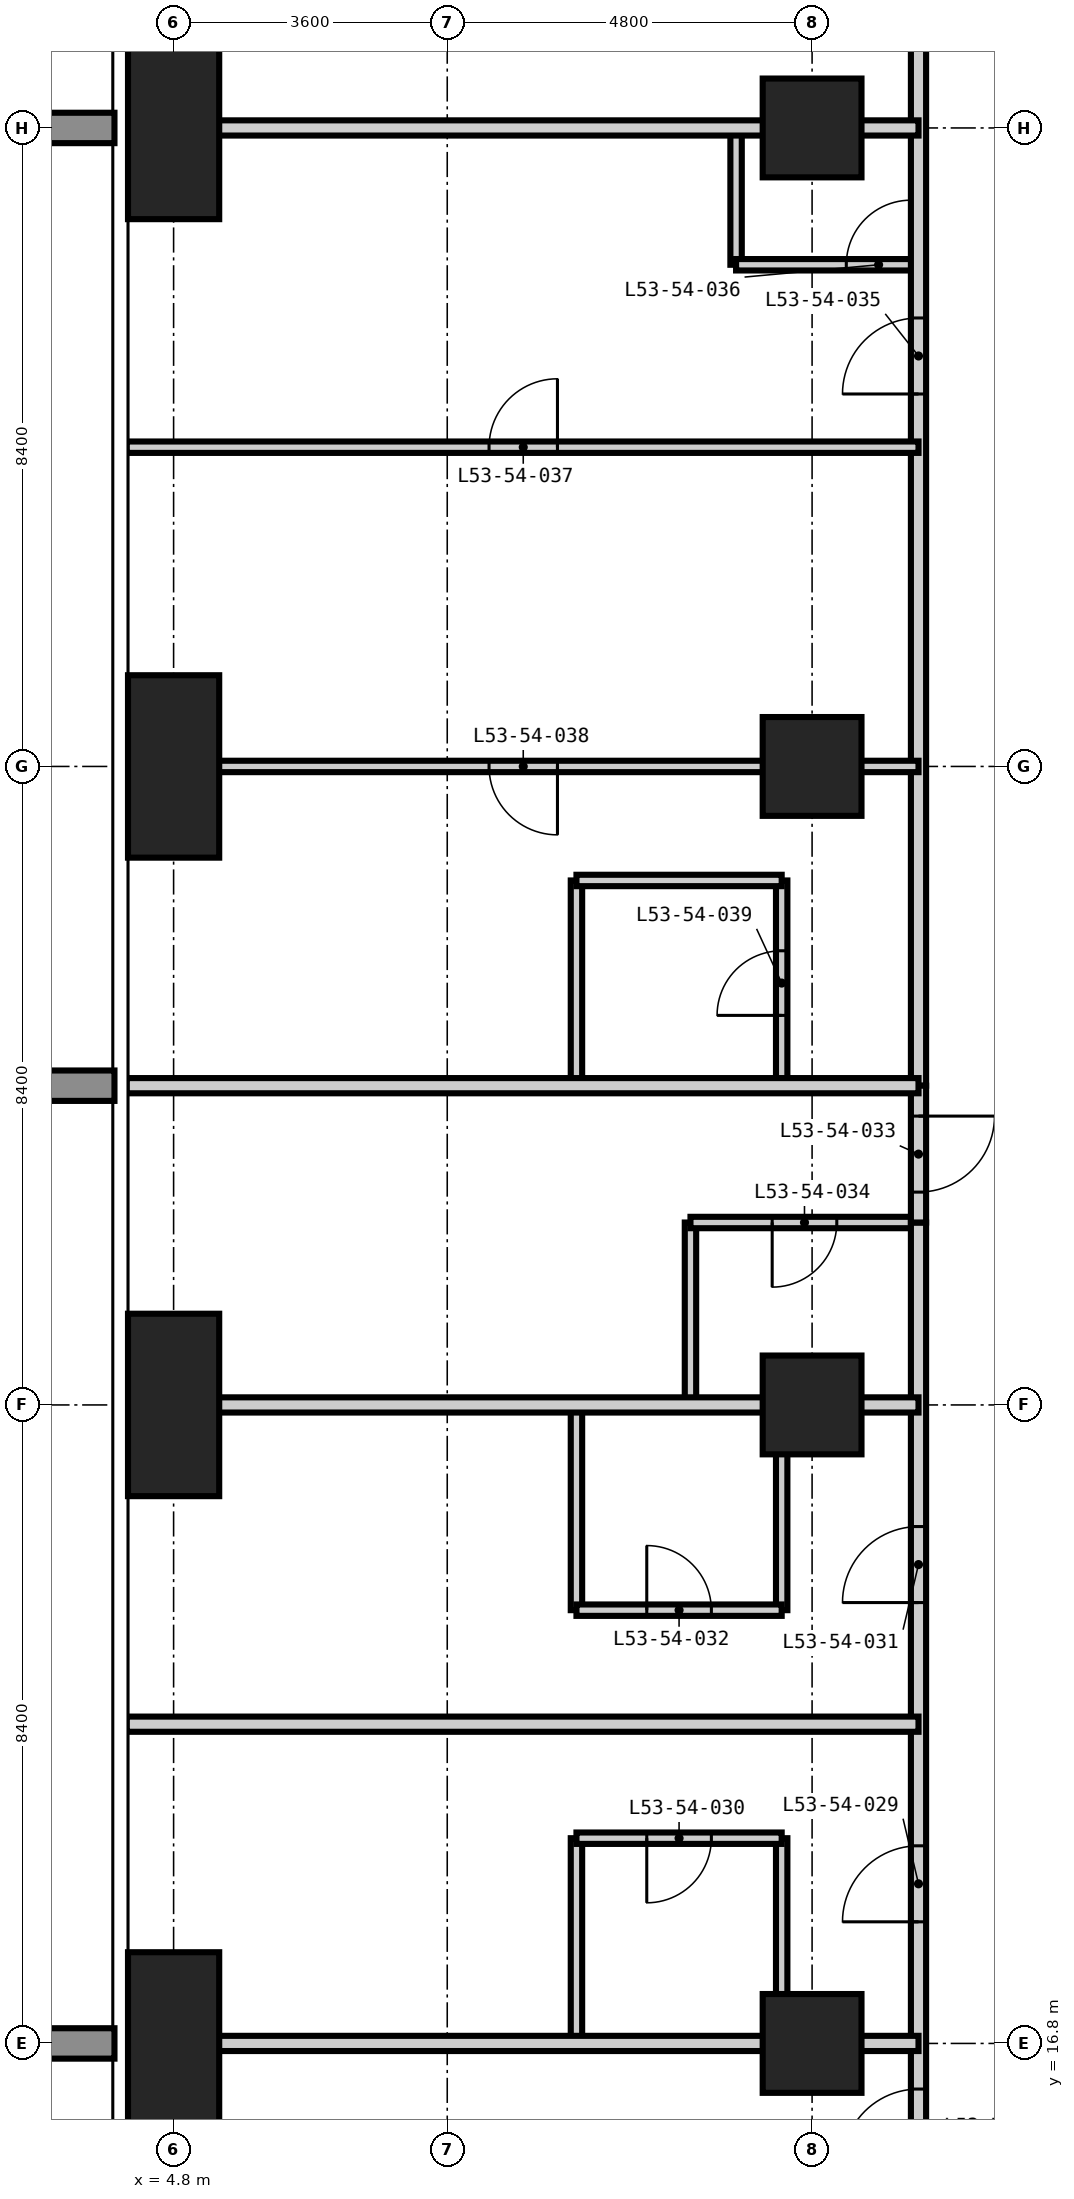
"""IFC4 building model, lengths in metres.
Left out: names, types, materials, properties, quantities, classifications, styles, units other than length and angle.
Written with IfcOpenShell. Run it as: python <this file> out.ifc"""

import sys

from ifc_helpers import new_model, si_unit, direction, frame, frame_2d, origin, origin_2d, place, context, subcontext, project, spatial, rectangle, extrude, element, fill, save


model = new_model("IFC4")
c1 = context("Model", 3, precision=1e-05, world=origin(), true_north=direction((0.0, 1.0)))
c2 = subcontext(c1, "Body", "Model", "MODEL_VIEW")
j1 = project(units=[si_unit("LENGTHUNIT", "METRE"), si_unit("PLANEANGLEUNIT", "RADIAN")], contexts=[c1])
p1 = place(None, origin())
s1 = spatial("IfcSite", under=j1, at=p1, CompositionType="ELEMENT")
p2 = place(p1, origin())
s2 = spatial("IfcBuilding", under=s1, at=p2, CompositionType="ELEMENT")
p3 = place(p2, frame((0.0, 0.0, 205.8)))
s3 = spatial("IfcBuildingStorey", under=s2, at=p3, CompositionType="ELEMENT", Elevation=205.8)
for number, where, z_axis, x_axis in (
    (1, (4.8, 16.8, -0.35), (0.0, 0.0, 1.0), (1.0, 0.0, 0.0)),
    (2, (4.8, 25.2, -0.35), (0.0, 0.0, 1.0), (1.0, 0.0, 0.0)),
    (3, (4.8, 33.6, -0.35), (0.0, 0.0, 1.0), (1.0, 0.0, 0.0)),
    (4, (4.8, 42.0, -0.35), (0.0, 0.0, 1.0), (1.0, 0.0, 0.0)),
):
    element("IfcColumn", number, at=place(p3, frame(where, z_axis=z_axis, x_axis=x_axis)), inside=s3, PredefinedType="COLUMN", context=c2, shape_type="SweptSolid", body=[
        extrude(rectangle(XDim=1.2, YDim=2.4, at=origin_2d()), origin(), (0.0, 0.0, 1.0), 3.6),
    ])
for number, where, z_axis, x_axis in (
    (5, (13.2, 16.8, -0.35), (0.0, 0.0, 1.0), (1.0, 0.0, 0.0)),
    (6, (13.2, 25.2, -0.35), (0.0, 0.0, 1.0), (1.0, 0.0, 0.0)),
    (7, (13.2, 33.6, -0.35), (0.0, 0.0, 1.0), (1.0, 0.0, 0.0)),
    (8, (13.2, 42.0, -0.35), (0.0, 0.0, 1.0), (1.0, 0.0, 0.0)),
):
    element("IfcColumn", number, at=place(p3, frame(where, z_axis=z_axis, x_axis=x_axis)), inside=s3, PredefinedType="COLUMN", context=c2, shape_type="SweptSolid", body=[
        extrude(rectangle(XDim=1.3, YDim=1.3, at=origin_2d()), origin(), (0.0, 0.0, 1.0), 3.6),
    ])
for number, where, z_axis, x_axis in (
    (9, (10.1, 16.8, 0.0), (0.0, 0.0, 1.0), (0.0, 1.0, 0.0)),
    (10, (10.1, 22.5, 0.0), (0.0, 0.0, 1.0), (0.0, 1.0, 0.0)),
):
    element("IfcWall", number, at=place(p3, frame(where, z_axis=z_axis, x_axis=x_axis)), inside=s3, PredefinedType="PARTITIONING", context=c2, shape_type="SweptSolid", body=[
        extrude(rectangle(XDim=2.7, YDim=0.15, at=frame_2d((1.35, 0.0))), origin(), (0.0, 0.0, 1.0), 3.25),
    ])
p4 = place(p3, frame((10.1, 29.4, 0.0), z_axis=(0.0, 0.0, 1.0), x_axis=(0.0, 1.0, 0.0)))
e11 = element("IfcWall", 11, at=p4, inside=s3, PredefinedType="PARTITIONING", context=c2, shape_type="SweptSolid", body=[
    extrude(rectangle(XDim=2.7, YDim=0.15, at=frame_2d((1.35, 0.0))), origin(), (0.0, 0.0, 1.0), 3.25),
])
p5 = place(p3, frame((11.6, 25.2, 0.0), z_axis=(0.0, 0.0, 1.0), x_axis=(0.0, 1.0, 0.0)))
e12 = element("IfcWall", 12, at=p5, inside=s3, PredefinedType="PARTITIONING", context=c2, shape_type="SweptSolid", body=[
    extrude(rectangle(XDim=2.4, YDim=0.15, at=frame_2d((1.2, 0.0))), origin(), (0.0, 0.0, 1.0), 3.25),
])
p6 = place(p3, frame((12.2, 40.2, 0.0), z_axis=(0.0, 0.0, 1.0), x_axis=(0.0, 1.0, 0.0)))
e13 = element("IfcWall", 13, at=p6, inside=s3, PredefinedType="PARTITIONING", context=c2, shape_type="SweptSolid", body=[
    extrude(rectangle(XDim=1.8, YDim=0.15, at=frame_2d((0.9, 0.0))), origin(), (0.0, 0.0, 1.0), 3.25),
])
for number, where, z_axis, x_axis in (
    (14, (12.8, 16.8, 0.0), (0.0, 0.0, 1.0), (0.0, 1.0, 0.0)),
    (15, (12.8, 22.5, 0.0), (0.0, 0.0, 1.0), (0.0, 1.0, 0.0)),
):
    element("IfcWall", number, at=place(p3, frame(where, z_axis=z_axis, x_axis=x_axis)), inside=s3, PredefinedType="PARTITIONING", context=c2, shape_type="SweptSolid", body=[
        extrude(rectangle(XDim=2.7, YDim=0.15, at=frame_2d((1.35, 0.0))), origin(), (0.0, 0.0, 1.0), 3.25),
    ])
p7 = place(p3, frame((12.8, 29.4, 0.0), z_axis=(0.0, 0.0, 1.0), x_axis=(0.0, 1.0, 0.0)))
e16 = element("IfcWall", 16, at=p7, inside=s3, PredefinedType="PARTITIONING", context=c2, shape_type="SweptSolid", body=[
    extrude(rectangle(XDim=2.7, YDim=0.15, at=frame_2d((1.35, 0.0))), origin(), (0.0, 0.0, 1.0), 3.25),
])
p8 = place(p7, frame((0.925, 0.0, 0.0)))
e17 = element("IfcOpeningElement", 17, at=p8, cuts=e16, PredefinedType="OPENING", context=c2, shape_type="SweptSolid", body=[
    extrude(rectangle(XDim=0.85, YDim=2.1, at=frame_2d((0.425, 1.05))), frame((0.0, 0.085, 0.0), z_axis=(0.0, -1.0, 0.0), x_axis=(1.0, 0.0, 0.0)), (0.0, 0.0, 1.0), 0.17),
])
p9 = place(p3, frame((10.1, 19.5, 0.0), z_axis=(0.0, 0.0, 1.0), x_axis=(1.0, 0.0, 0.0)))
e18 = element("IfcWall", 18, at=p9, inside=s3, PredefinedType="PARTITIONING", context=c2, shape_type="SweptSolid", body=[
    extrude(rectangle(XDim=2.7, YDim=0.15, at=frame_2d((1.35, 0.0))), origin(), (0.0, 0.0, 1.0), 3.25),
])
p10 = place(p9, frame((0.925, 0.0, 0.0)))
e19 = element("IfcOpeningElement", 19, at=p10, cuts=e18, PredefinedType="OPENING", context=c2, shape_type="SweptSolid", body=[
    extrude(rectangle(XDim=0.85, YDim=2.1, at=frame_2d((0.425, 1.05))), frame((0.0, 0.085, 0.0), z_axis=(0.0, -1.0, 0.0), x_axis=(1.0, 0.0, 0.0)), (0.0, 0.0, 1.0), 0.17),
])
p11 = place(p3, frame((10.1, 22.5, 0.0), z_axis=(0.0, 0.0, 1.0), x_axis=(1.0, 0.0, 0.0)))
e20 = element("IfcWall", 20, at=p11, inside=s3, PredefinedType="PARTITIONING", context=c2, shape_type="SweptSolid", body=[
    extrude(rectangle(XDim=2.7, YDim=0.15, at=frame_2d((1.35, 0.0))), origin(), (0.0, 0.0, 1.0), 3.25),
])
p12 = place(p11, frame((0.925, 0.0, 0.0)))
e21 = element("IfcOpeningElement", 21, at=p12, cuts=e20, PredefinedType="OPENING", context=c2, shape_type="SweptSolid", body=[
    extrude(rectangle(XDim=0.85, YDim=2.1, at=frame_2d((0.425, 1.05))), frame((0.0, 0.085, 0.0), z_axis=(0.0, -1.0, 0.0), x_axis=(1.0, 0.0, 0.0)), (0.0, 0.0, 1.0), 0.17),
])
p13 = place(p3, frame((11.6, 27.6, 0.0), z_axis=(0.0, 0.0, 1.0), x_axis=(1.0, 0.0, 0.0)))
e22 = element("IfcWall", 22, at=p13, inside=s3, PredefinedType="PARTITIONING", context=c2, shape_type="SweptSolid", body=[
    extrude(rectangle(XDim=3.0, YDim=0.15, at=frame_2d((1.5, 0.0))), origin(), (0.0, 0.0, 1.0), 3.25),
])
p14 = place(p13, frame((1.075, 0.0, 0.0)))
e23 = element("IfcOpeningElement", 23, at=p14, cuts=e22, PredefinedType="OPENING", context=c2, shape_type="SweptSolid", body=[
    extrude(rectangle(XDim=0.85, YDim=2.1, at=frame_2d((0.425, 1.05))), frame((0.0, 0.085, 0.0), z_axis=(0.0, -1.0, 0.0), x_axis=(1.0, 0.0, 0.0)), (0.0, 0.0, 1.0), 0.17),
])
p15 = place(p3, frame((10.1, 32.1, 0.0), z_axis=(0.0, 0.0, 1.0), x_axis=(1.0, 0.0, 0.0)))
e24 = element("IfcWall", 24, at=p15, inside=s3, PredefinedType="PARTITIONING", context=c2, shape_type="SweptSolid", body=[
    extrude(rectangle(XDim=2.7, YDim=0.15, at=frame_2d((1.35, 0.0))), origin(), (0.0, 0.0, 1.0), 3.25),
])
p16 = place(p3, frame((12.2, 40.2, 0.0), z_axis=(0.0, 0.0, 1.0), x_axis=(1.0, 0.0, 0.0)))
e25 = element("IfcWall", 25, at=p16, inside=s3, PredefinedType="PARTITIONING", context=c2, shape_type="SweptSolid", body=[
    extrude(rectangle(XDim=2.4, YDim=0.15, at=frame_2d((1.2, 0.0))), origin(), (0.0, 0.0, 1.0), 3.25),
])
p17 = place(p16, frame((1.45, 0.0, 0.0)))
e26 = element("IfcOpeningElement", 26, at=p17, cuts=e25, PredefinedType="OPENING", context=c2, shape_type="SweptSolid", body=[
    extrude(rectangle(XDim=0.85, YDim=2.1, at=frame_2d((0.425, 1.05))), frame((0.0, 0.085, 0.0), z_axis=(0.0, -1.0, 0.0), x_axis=(1.0, 0.0, 0.0)), (0.0, 0.0, 1.0), 0.17),
])
p18 = place(p3, frame((14.6, 14.6, 0.0), z_axis=(0.0, 0.0, 1.0), x_axis=(0.0, 1.0, 0.0)))
e27 = element("IfcWall", 27, at=p18, inside=s3, PredefinedType="PARTITIONING", context=c2, shape_type="SweptSolid", body=[
    extrude(rectangle(XDim=13.0, YDim=0.2, at=frame_2d((6.5, 0.0))), origin(), (0.0, 0.0, 1.0), 3.25),
])
p19 = place(p18, frame((3.8, 0.0, 0.0)))
e28 = element("IfcOpeningElement", 28, at=p19, cuts=e27, PredefinedType="OPENING", context=c2, shape_type="SweptSolid", body=[
    extrude(rectangle(XDim=1.0, YDim=2.2, at=frame_2d((0.5, 1.1))), frame((0.0, 0.11, 0.0), z_axis=(0.0, -1.0, 0.0), x_axis=(1.0, 0.0, 0.0)), (0.0, 0.0, 1.0), 0.22),
])
p20 = place(p18, frame((8.0, 0.0, 0.0)))
e29 = element("IfcOpeningElement", 29, at=p20, cuts=e27, PredefinedType="OPENING", context=c2, shape_type="SweptSolid", body=[
    extrude(rectangle(XDim=1.0, YDim=2.2, at=frame_2d((0.5, 1.1))), frame((0.0, 0.11, 0.0), z_axis=(0.0, -1.0, 0.0), x_axis=(1.0, 0.0, 0.0)), (0.0, 0.0, 1.0), 0.22),
])
p21 = place(p18, frame((0.6, 0.0, 0.0)))
e30 = element("IfcOpeningElement", 30, at=p21, cuts=e27, PredefinedType="OPENING", context=c2, shape_type="SweptSolid", body=[
    extrude(rectangle(XDim=1.0, YDim=2.2, at=frame_2d((0.5, 1.1))), frame((0.0, 0.11, 0.0), z_axis=(0.0, -1.0, 0.0), x_axis=(1.0, 0.0, 0.0)), (0.0, 0.0, 1.0), 0.22),
])
p22 = place(p3, frame((14.6, 29.4, 0.0), z_axis=(0.0, 0.0, 1.0), x_axis=(0.0, 1.0, 0.0)))
e31 = element("IfcWall", 31, at=p22, inside=s3, PredefinedType="PARTITIONING", context=c2, shape_type="SweptSolid", body=[
    extrude(rectangle(XDim=16.0, YDim=0.2, at=frame_2d((8.0, 0.0))), origin(), (0.0, 0.0, 1.0), 3.25),
])
p23 = place(p22, frame((9.1, 0.0, 0.0)))
e32 = element("IfcOpeningElement", 32, at=p23, cuts=e31, PredefinedType="OPENING", context=c2, shape_type="SweptSolid", body=[
    extrude(rectangle(XDim=1.0, YDim=2.2, at=frame_2d((0.5, 1.1))), frame((0.0, 0.11, 0.0), z_axis=(0.0, -1.0, 0.0), x_axis=(1.0, 0.0, 0.0)), (0.0, 0.0, 1.0), 0.22),
])
p24 = place(p22, frame((13.8, 0.0, 0.0)))
e33 = element("IfcOpeningElement", 33, at=p24, cuts=e31, PredefinedType="OPENING", context=c2, shape_type="SweptSolid", body=[
    extrude(rectangle(XDim=1.0, YDim=2.2, at=frame_2d((0.5, 1.1))), frame((0.0, 0.11, 0.0), z_axis=(0.0, -1.0, 0.0), x_axis=(1.0, 0.0, 0.0)), (0.0, 0.0, 1.0), 0.22),
])
p25 = place(p3, frame((14.6, 29.4, 0.0), z_axis=(0.0, 0.0, 1.0), x_axis=(0.0, -1.0, 0.0)))
e34 = element("IfcWall", 34, at=p25, inside=s3, PredefinedType="PARTITIONING", context=c2, shape_type="SweptSolid", body=[
    extrude(rectangle(XDim=1.8, YDim=0.2, at=frame_2d((0.9, 0.0))), origin(), (0.0, 0.0, 1.0), 3.25),
])
p26 = place(p25, frame((0.4, 0.0, 0.0)))
e35 = element("IfcOpeningElement", 35, at=p26, cuts=e34, PredefinedType="OPENING", context=c2, shape_type="SweptSolid", body=[
    extrude(rectangle(XDim=1.0, YDim=2.2, at=frame_2d((0.5, 1.1))), frame((0.0, 0.11, 0.0), z_axis=(0.0, -1.0, 0.0), x_axis=(1.0, 0.0, 0.0)), (0.0, 0.0, 1.0), 0.22),
])
for number, where, z_axis, x_axis in (
    (36, (4.182, 16.8, 0.0), (0.0, 0.0, 1.0), (1.0, 0.0, 0.0)),
    (37, (4.182, 21.0, 0.0), (0.0, 0.0, 1.0), (1.0, 0.0, 0.0)),
    (38, (4.182, 25.2, 0.0), (0.0, 0.0, 1.0), (1.0, 0.0, 0.0)),
    (39, (4.182, 29.4, 0.0), (0.0, 0.0, 1.0), (1.0, 0.0, 0.0)),
    (40, (4.182, 42.0, 0.0), (0.0, 0.0, 1.0), (1.0, 0.0, 0.0)),
):
    element("IfcWall", number, at=place(p3, frame(where, z_axis=z_axis, x_axis=x_axis)), inside=s3, PredefinedType="PARTITIONING", context=c2, shape_type="SweptSolid", body=[
        extrude(rectangle(XDim=10.418, YDim=0.2, at=frame_2d((5.209, 0.0))), origin(), (0.0, 0.0, 1.0), 3.25),
    ])
p27 = place(p3, frame((4.182, 33.6, 0.0), z_axis=(0.0, 0.0, 1.0), x_axis=(1.0, 0.0, 0.0)))
e41 = element("IfcWall", 41, at=p27, inside=s3, PredefinedType="PARTITIONING", context=c2, shape_type="SweptSolid", body=[
    extrude(rectangle(XDim=10.418, YDim=0.15, at=frame_2d((5.209, 0.0))), origin(), (0.0, 0.0, 1.0), 3.25),
])
p28 = place(p27, frame((4.768, 0.0, 0.0)))
e42 = element("IfcOpeningElement", 42, at=p28, cuts=e41, PredefinedType="OPENING", context=c2, shape_type="SweptSolid", body=[
    extrude(rectangle(XDim=0.9, YDim=2.1, at=frame_2d((0.45, 1.05))), frame((0.0, 0.085, 0.0), z_axis=(0.0, -1.0, 0.0), x_axis=(1.0, 0.0, 0.0)), (0.0, 0.0, 1.0), 0.17),
])
p29 = place(p3, frame((4.182, 37.8, 0.0), z_axis=(0.0, 0.0, 1.0), x_axis=(1.0, 0.0, 0.0)))
e43 = element("IfcWall", 43, at=p29, inside=s3, PredefinedType="PARTITIONING", context=c2, shape_type="SweptSolid", body=[
    extrude(rectangle(XDim=10.418, YDim=0.15, at=frame_2d((5.209, 0.0))), origin(), (0.0, 0.0, 1.0), 3.25),
])
p30 = place(p29, frame((4.768, 0.0, 0.0)))
e44 = element("IfcOpeningElement", 44, at=p30, cuts=e43, PredefinedType="OPENING", context=c2, shape_type="SweptSolid", body=[
    extrude(rectangle(XDim=0.9, YDim=2.1, at=frame_2d((0.45, 1.05))), frame((0.0, 0.085, 0.0), z_axis=(0.0, -1.0, 0.0), x_axis=(1.0, 0.0, 0.0)), (0.0, 0.0, 1.0), 0.17),
])
p31 = place(p19, origin())
e45 = element("IfcDoor", 45, at=p31, inside=s3, OperationType="SINGLE_SWING_LEFT", PredefinedType="DOOR", context=c2, shape_type="SweptSolid", body=[
    extrude(rectangle(XDim=1.0, YDim=2.2, at=frame_2d((0.5, 1.1))), frame((0.0, 0.025, 0.0), z_axis=(0.0, -1.0, 0.0), x_axis=(1.0, 0.0, 0.0)), (0.0, 0.0, 1.0), 0.05),
])
fill(e28, e45)
p32 = place(p10, frame((0.85, 0.0, 0.0), z_axis=(0.0, 0.0, 1.0), x_axis=(-1.0, 0.0, 0.0)))
e46 = element("IfcDoor", 46, at=p32, inside=s3, OperationType="SINGLE_SWING_RIGHT", PredefinedType="DOOR", context=c2, shape_type="SweptSolid", body=[
    extrude(rectangle(XDim=0.85, YDim=2.1, at=frame_2d((0.425, 1.05))), frame((0.0, 0.025, 0.0), z_axis=(0.0, -1.0, 0.0), x_axis=(1.0, 0.0, 0.0)), (0.0, 0.0, 1.0), 0.05),
])
fill(e19, e46)
p33 = place(p20, origin())
e47 = element("IfcDoor", 47, at=p33, inside=s3, OperationType="SINGLE_SWING_LEFT", PredefinedType="DOOR", context=c2, shape_type="SweptSolid", body=[
    extrude(rectangle(XDim=1.0, YDim=2.2, at=frame_2d((0.5, 1.1))), frame((0.0, 0.025, 0.0), z_axis=(0.0, -1.0, 0.0), x_axis=(1.0, 0.0, 0.0)), (0.0, 0.0, 1.0), 0.05),
])
fill(e29, e47)
p34 = place(p12, origin())
e48 = element("IfcDoor", 48, at=p34, inside=s3, OperationType="SINGLE_SWING_LEFT", PredefinedType="DOOR", context=c2, shape_type="SweptSolid", body=[
    extrude(rectangle(XDim=0.85, YDim=2.1, at=frame_2d((0.425, 1.05))), frame((0.0, 0.025, 0.0), z_axis=(0.0, -1.0, 0.0), x_axis=(1.0, 0.0, 0.0)), (0.0, 0.0, 1.0), 0.05),
])
fill(e21, e48)
p35 = place(p26, origin())
e49 = element("IfcDoor", 49, at=p35, inside=s3, OperationType="SINGLE_SWING_LEFT", PredefinedType="DOOR", context=c2, shape_type="SweptSolid", body=[
    extrude(rectangle(XDim=1.0, YDim=2.2, at=frame_2d((0.5, 1.1))), frame((0.0, 0.025, 0.0), z_axis=(0.0, -1.0, 0.0), x_axis=(1.0, 0.0, 0.0)), (0.0, 0.0, 1.0), 0.05),
])
fill(e35, e49)
p36 = place(p14, frame((0.85, 0.0, 0.0), z_axis=(0.0, 0.0, 1.0), x_axis=(-1.0, 0.0, 0.0)))
e50 = element("IfcDoor", 50, at=p36, inside=s3, OperationType="SINGLE_SWING_RIGHT", PredefinedType="DOOR", context=c2, shape_type="SweptSolid", body=[
    extrude(rectangle(XDim=0.85, YDim=2.1, at=frame_2d((0.425, 1.05))), frame((0.0, 0.025, 0.0), z_axis=(0.0, -1.0, 0.0), x_axis=(1.0, 0.0, 0.0)), (0.0, 0.0, 1.0), 0.05),
])
fill(e23, e50)
p37 = place(p23, origin())
e51 = element("IfcDoor", 51, at=p37, inside=s3, OperationType="SINGLE_SWING_LEFT", PredefinedType="DOOR", context=c2, shape_type="SweptSolid", body=[
    extrude(rectangle(XDim=1.0, YDim=2.2, at=frame_2d((0.5, 1.1))), frame((0.0, 0.025, 0.0), z_axis=(0.0, -1.0, 0.0), x_axis=(1.0, 0.0, 0.0)), (0.0, 0.0, 1.0), 0.05),
])
fill(e32, e51)
p38 = place(p17, origin())
e52 = element("IfcDoor", 52, at=p38, inside=s3, OperationType="SINGLE_SWING_RIGHT", PredefinedType="DOOR", context=c2, shape_type="SweptSolid", body=[
    extrude(rectangle(XDim=0.85, YDim=2.1, at=frame_2d((0.425, 1.05))), frame((0.0, 0.025, 0.0), z_axis=(0.0, -1.0, 0.0), x_axis=(1.0, 0.0, 0.0)), (0.0, 0.0, 1.0), 0.05),
])
fill(e26, e52)
p39 = place(p30, origin())
e53 = element("IfcDoor", 53, at=p39, inside=s3, OperationType="SINGLE_SWING_RIGHT", PredefinedType="DOOR", context=c2, shape_type="SweptSolid", body=[
    extrude(rectangle(XDim=0.9, YDim=2.1, at=frame_2d((0.45, 1.05))), frame((0.0, 0.025, 0.0), z_axis=(0.0, -1.0, 0.0), x_axis=(1.0, 0.0, 0.0)), (0.0, 0.0, 1.0), 0.05),
])
fill(e44, e53)
p40 = place(p28, frame((0.9, 0.0, 0.0), z_axis=(0.0, 0.0, 1.0), x_axis=(-1.0, 0.0, 0.0)))
e54 = element("IfcDoor", 54, at=p40, inside=s3, OperationType="SINGLE_SWING_LEFT", PredefinedType="DOOR", context=c2, shape_type="SweptSolid", body=[
    extrude(rectangle(XDim=0.9, YDim=2.1, at=frame_2d((0.45, 1.05))), frame((0.0, 0.025, 0.0), z_axis=(0.0, -1.0, 0.0), x_axis=(1.0, 0.0, 0.0)), (0.0, 0.0, 1.0), 0.05),
])
fill(e42, e54)
p41 = place(p8, origin())
e55 = element("IfcDoor", 55, at=p41, inside=s3, OperationType="SINGLE_SWING_LEFT", PredefinedType="DOOR", context=c2, shape_type="SweptSolid", body=[
    extrude(rectangle(XDim=0.85, YDim=2.1, at=frame_2d((0.425, 1.05))), frame((0.0, 0.025, 0.0), z_axis=(0.0, -1.0, 0.0), x_axis=(1.0, 0.0, 0.0)), (0.0, 0.0, 1.0), 0.05),
])
fill(e17, e55)
p42 = place(p21, origin())
e56 = element("IfcDoor", 56, at=p42, inside=s3, OperationType="SINGLE_SWING_LEFT", PredefinedType="DOOR", context=c2, shape_type="SweptSolid", body=[
    extrude(rectangle(XDim=1.0, YDim=2.2, at=frame_2d((0.5, 1.1))), frame((0.0, 0.025, 0.0), z_axis=(0.0, -1.0, 0.0), x_axis=(1.0, 0.0, 0.0)), (0.0, 0.0, 1.0), 0.05),
])
fill(e30, e56)
save(model, sys.argv[1])
